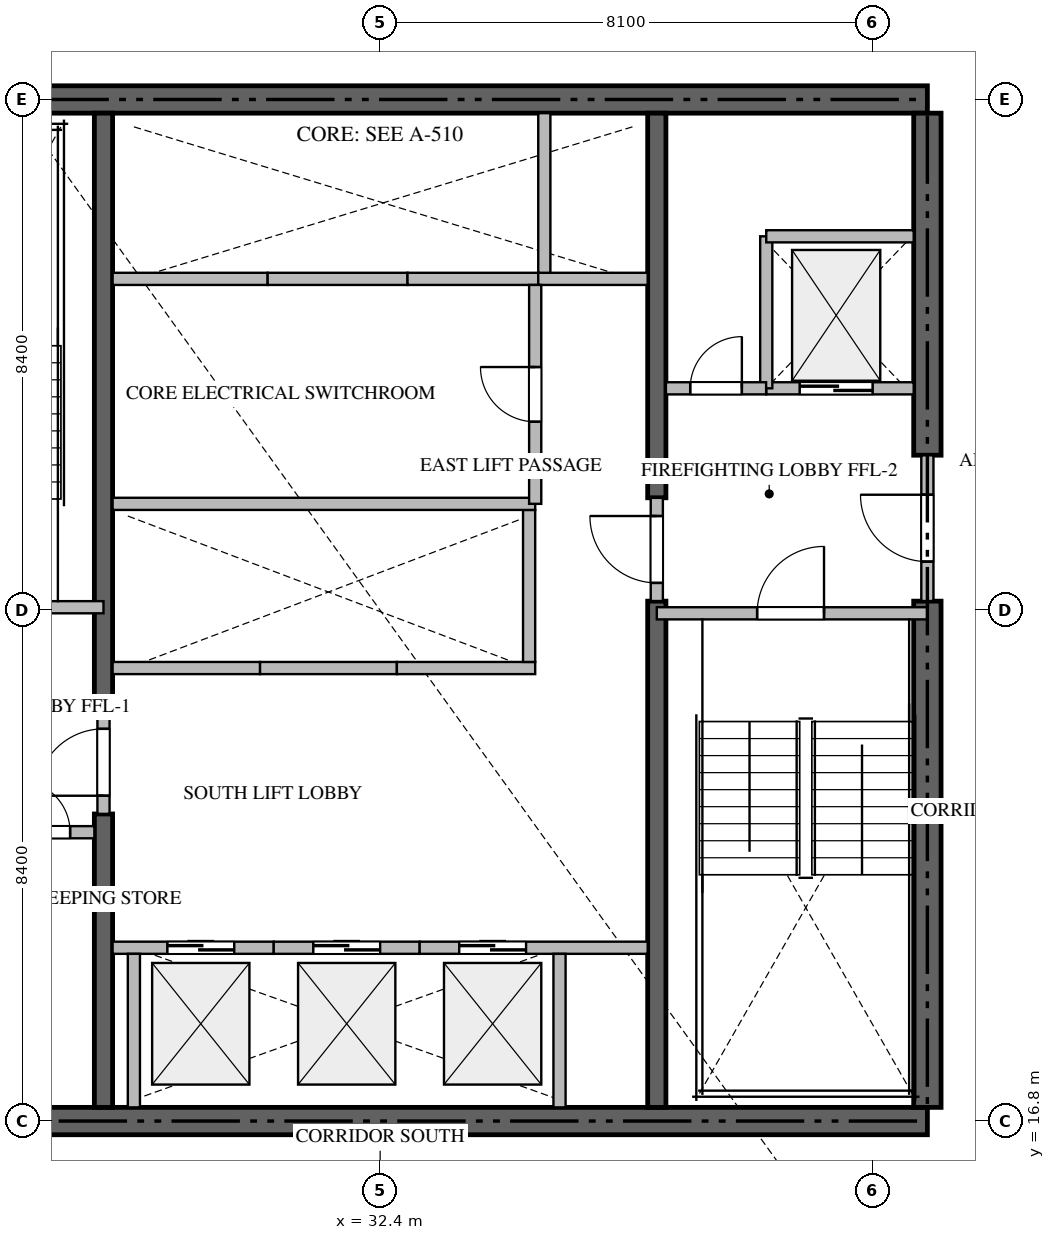
"""IFC4 building model, lengths in metres.
Left out: names, types, materials, properties, quantities, classifications, styles, units other than length and angle.
Written with IfcOpenShell. Run it as: python <this file> out.ifc"""

import sys

from ifc_helpers import new_model, si_unit, direction, frame, frame_2d, origin, place, context, subcontext, project, spatial, rectangle, extrude, source, transform, mapped, element, fill, save


model = new_model("IFC4")
c1 = context("Model", 3, precision=1e-05, world=origin(), true_north=direction((0.0, 1.0)))
c2 = subcontext(c1, "Body", "Model", "MODEL_VIEW")
j1 = project(units=[si_unit("LENGTHUNIT", "METRE"), si_unit("PLANEANGLEUNIT", "RADIAN")], contexts=[c1])
p1 = place(None, origin())
s1 = spatial("IfcSite", under=j1, at=p1, CompositionType="ELEMENT")
p2 = place(p1, origin())
s2 = spatial("IfcBuilding", under=s1, at=p2, CompositionType="ELEMENT")
p3 = place(p2, frame((0.0, 0.0, 86.7)))
s3 = spatial("IfcBuildingStorey", under=s2, at=p3, CompositionType="ELEMENT", Elevation=86.7)
for number, where, z_axis, x_axis in (
    (1, (23.4, 16.8, -0.26), (0.0, 0.0, 1.0), (1.0, 0.0, 0.0)),
    (2, (41.4, 33.6, -0.26), (0.0, 0.0, 1.0), (-1.0, 0.0, 0.0)),
):
    element("IfcWall", number, at=place(p3, frame(where, z_axis=z_axis, x_axis=x_axis)), inside=s3, PredefinedType="SHEAR", context=c2, shape_type="SweptSolid", body=[
        extrude(rectangle(XDim=18.0, YDim=0.45, at=frame_2d((9.0, 0.0))), origin(), (0.0, 0.0, 1.0), 3.748),
    ])
p4 = place(p3, frame((41.4, 17.025, -0.26), z_axis=(0.0, 0.0, 1.0), x_axis=(0.0, 1.0, 0.0)))
e3 = element("IfcWall", 3, at=p4, inside=s3, PredefinedType="SHEAR", context=c2, shape_type="SweptSolid", body=[
    extrude(rectangle(XDim=8.325, YDim=0.45, at=frame_2d((4.163, 0.0))), origin(), (0.0, 0.0, 1.0), 3.748),
])
p5 = place(p3, frame((41.4, 27.75, -0.26), z_axis=(0.0, 0.0, 1.0), x_axis=(0.0, 1.0, 0.0)))
e4 = element("IfcWall", 4, at=p5, inside=s3, PredefinedType="SHEAR", context=c2, shape_type="SweptSolid", body=[
    extrude(rectangle(XDim=5.625, YDim=0.45, at=frame_2d((2.812, 0.0))), origin(), (0.0, 0.0, 1.0), 3.748),
])
p6 = place(p3, frame((27.85, 17.025, -0.26), z_axis=(0.0, 0.0, 1.0), x_axis=(0.0, 1.0, 0.0)))
e5 = element("IfcWall", 5, at=p6, inside=s3, PredefinedType="SHEAR", context=c2, shape_type="SweptSolid", body=[
    extrude(rectangle(XDim=4.825, YDim=0.3, at=frame_2d((2.413, 0.0))), origin(), (0.0, 0.0, 1.0), 3.748),
])
p7 = place(p3, frame((27.85, 23.55, -0.26), z_axis=(0.0, 0.0, 1.0), x_axis=(0.0, 1.0, 0.0)))
e6 = element("IfcWall", 6, at=p7, inside=s3, PredefinedType="SHEAR", context=c2, shape_type="SweptSolid", body=[
    extrude(rectangle(XDim=9.825, YDim=0.3, at=frame_2d((4.913, 0.0))), origin(), (0.0, 0.0, 1.0), 3.748),
])
p8 = place(p3, frame((36.95, 17.025, -0.26), z_axis=(0.0, 0.0, 1.0), x_axis=(0.0, 1.0, 0.0)))
e7 = element("IfcWall", 7, at=p8, inside=s3, PredefinedType="SHEAR", context=c2, shape_type="SweptSolid", body=[
    extrude(rectangle(XDim=8.325, YDim=0.3, at=frame_2d((4.163, 0.0))), origin(), (0.0, 0.0, 1.0), 3.748),
])
p9 = place(p3, frame((36.95, 27.05, -0.26), z_axis=(0.0, 0.0, 1.0), x_axis=(0.0, 1.0, 0.0)))
e8 = element("IfcWall", 8, at=p9, inside=s3, PredefinedType="SHEAR", context=c2, shape_type="SweptSolid", body=[
    extrude(rectangle(XDim=6.325, YDim=0.3, at=frame_2d((3.163, 0.0))), origin(), (0.0, 0.0, 1.0), 3.748),
])
p10 = place(p3, frame((23.4, 25.25, 0.0), z_axis=(0.0, 0.0, 1.0), x_axis=(1.0, 0.0, 0.0)))
e9 = element("IfcWall", 9, at=p10, inside=s3, PredefinedType="STANDARD", context=c2, shape_type="SweptSolid", body=[
    extrude(rectangle(XDim=4.45, YDim=0.2, at=frame_2d((2.225, 0.0))), origin(), (0.0, 0.0, 1.0), 3.49),
])
p11 = place(p10, frame((1.65, 0.0, 0.0)))
e10 = element("IfcOpeningElement", 10, at=p11, cuts=e9, PredefinedType="OPENING", context=c2, shape_type="SweptSolid", body=[
    extrude(rectangle(XDim=1.1, YDim=2.15, at=frame_2d((0.55, 1.075))), frame((0.0, 0.11, 0.0), z_axis=(0.0, -1.0, 0.0), x_axis=(1.0, 0.0, 0.0)), (0.0, 0.0, 1.0), 0.22),
])
p12 = place(p3, frame((36.95, 25.15, 0.0), z_axis=(0.0, 0.0, 1.0), x_axis=(1.0, 0.0, 0.0)))
e11 = element("IfcWall", 11, at=p12, inside=s3, PredefinedType="STANDARD", context=c2, shape_type="SweptSolid", body=[
    extrude(rectangle(XDim=4.45, YDim=0.2, at=frame_2d((2.225, 0.0))), origin(), (0.0, 0.0, 1.0), 3.49),
])
p13 = place(p12, frame((1.65, 0.0, 0.0)))
e12 = element("IfcOpeningElement", 12, at=p13, cuts=e11, PredefinedType="OPENING", context=c2, shape_type="SweptSolid", body=[
    extrude(rectangle(XDim=1.1, YDim=2.15, at=frame_2d((0.55, 1.075))), frame((0.0, 0.11, 0.0), z_axis=(0.0, -1.0, 0.0), x_axis=(1.0, 0.0, 0.0)), (0.0, 0.0, 1.0), 0.22),
])
p14 = place(p3, frame((38.75, 28.85, 0.0), z_axis=(0.0, 0.0, 1.0), x_axis=(1.0, 0.0, 0.0)))
e13 = element("IfcWall", 13, at=p14, inside=s3, PredefinedType="STANDARD", context=c2, shape_type="SweptSolid", body=[
    extrude(rectangle(XDim=2.425, YDim=0.2, at=frame_2d((1.212, 0.0))), origin(), (0.0, 0.0, 1.0), 3.49),
])
p15 = place(p14, frame((0.55, 0.0, 0.0)))
e14 = element("IfcOpeningElement", 14, at=p15, cuts=e13, PredefinedType="OPENING", context=c2, shape_type="SweptSolid", body=[
    extrude(rectangle(XDim=1.2, YDim=2.2, at=frame_2d((0.6, 1.1))), frame((0.0, 0.11, 0.0), z_axis=(0.0, -1.0, 0.0), x_axis=(1.0, 0.0, 0.0)), (0.0, 0.0, 1.0), 0.22),
])
p16 = place(p3, frame((28.0, 19.65, 0.0), z_axis=(0.0, 0.0, 1.0), x_axis=(1.0, 0.0, 0.0)))
e15 = element("IfcWall", 15, at=p16, inside=s3, PredefinedType="STANDARD", context=c2, shape_type="SweptSolid", body=[
    extrude(rectangle(XDim=2.65, YDim=0.2, at=frame_2d((1.325, 0.0))), origin(), (0.0, 0.0, 1.0), 3.49),
])
p17 = place(p16, frame((0.9, 0.0, 0.0)))
e16 = element("IfcOpeningElement", 16, at=p17, cuts=e15, PredefinedType="OPENING", context=c2, shape_type="SweptSolid", body=[
    extrude(rectangle(XDim=1.1, YDim=2.2, at=frame_2d((0.55, 1.1))), frame((0.0, 0.11, 0.0), z_axis=(0.0, -1.0, 0.0), x_axis=(1.0, 0.0, 0.0)), (0.0, 0.0, 1.0), 0.22),
])
p18 = place(p3, frame((28.35, 17.025, 0.0), z_axis=(0.0, 0.0, 1.0), x_axis=(0.0, 1.0, 0.0)))
e17 = element("IfcWall", 17, at=p18, inside=s3, PredefinedType="STANDARD", context=c2, shape_type="SweptSolid", body=[
    extrude(rectangle(XDim=2.525, YDim=0.2, at=frame_2d((1.263, 0.0))), origin(), (0.0, 0.0, 1.0), 3.49),
])
p19 = place(p3, frame((30.65, 19.65, 0.0), z_axis=(0.0, 0.0, 1.0), x_axis=(1.0, 0.0, 0.0)))
e18 = element("IfcWall", 18, at=p19, inside=s3, PredefinedType="STANDARD", context=c2, shape_type="SweptSolid", body=[
    extrude(rectangle(XDim=2.4, YDim=0.2, at=frame_2d((1.2, 0.0))), origin(), (0.0, 0.0, 1.0), 3.49),
])
p20 = place(p19, frame((0.65, 0.0, 0.0)))
e19 = element("IfcOpeningElement", 19, at=p20, cuts=e18, PredefinedType="OPENING", context=c2, shape_type="SweptSolid", body=[
    extrude(rectangle(XDim=1.1, YDim=2.2, at=frame_2d((0.55, 1.1))), frame((0.0, 0.11, 0.0), z_axis=(0.0, -1.0, 0.0), x_axis=(1.0, 0.0, 0.0)), (0.0, 0.0, 1.0), 0.22),
])
p21 = place(p3, frame((33.05, 19.65, 0.0), z_axis=(0.0, 0.0, 1.0), x_axis=(1.0, 0.0, 0.0)))
e20 = element("IfcWall", 20, at=p21, inside=s3, PredefinedType="STANDARD", context=c2, shape_type="SweptSolid", body=[
    extrude(rectangle(XDim=3.75, YDim=0.2, at=frame_2d((1.875, 0.0))), origin(), (0.0, 0.0, 1.0), 3.49),
])
p22 = place(p21, frame((0.65, 0.0, 0.0)))
e21 = element("IfcOpeningElement", 21, at=p22, cuts=e20, PredefinedType="OPENING", context=c2, shape_type="SweptSolid", body=[
    extrude(rectangle(XDim=1.1, YDim=2.2, at=frame_2d((0.55, 1.1))), frame((0.0, 0.11, 0.0), z_axis=(0.0, -1.0, 0.0), x_axis=(1.0, 0.0, 0.0)), (0.0, 0.0, 1.0), 0.22),
])
p23 = place(p3, frame((35.35, 17.025, 0.0), z_axis=(0.0, 0.0, 1.0), x_axis=(0.0, 1.0, 0.0)))
e22 = element("IfcWall", 22, at=p23, inside=s3, PredefinedType="STANDARD", context=c2, shape_type="SweptSolid", body=[
    extrude(rectangle(XDim=2.525, YDim=0.2, at=frame_2d((1.263, 0.0))), origin(), (0.0, 0.0, 1.0), 3.49),
])
p24 = place(p3, frame((28.0, 24.25, 0.0), z_axis=(0.0, 0.0, 1.0), x_axis=(1.0, 0.0, 0.0)))
e23 = element("IfcWall", 23, at=p24, inside=s3, PredefinedType="STANDARD", context=c2, shape_type="SweptSolid", body=[
    extrude(rectangle(XDim=2.425, YDim=0.2, at=frame_2d((1.212, 0.0))), origin(), (0.0, 0.0, 1.0), 3.49),
])
p25 = place(p3, frame((30.425, 24.25, 0.0), z_axis=(0.0, 0.0, 1.0), x_axis=(1.0, 0.0, 0.0)))
e24 = element("IfcWall", 24, at=p25, inside=s3, PredefinedType="STANDARD", context=c2, shape_type="SweptSolid", body=[
    extrude(rectangle(XDim=2.25, YDim=0.2, at=frame_2d((1.125, 0.0))), origin(), (0.0, 0.0, 1.0), 3.49),
])
p26 = place(p3, frame((32.675, 24.25, 0.0), z_axis=(0.0, 0.0, 1.0), x_axis=(1.0, 0.0, 0.0)))
e25 = element("IfcWall", 25, at=p26, inside=s3, PredefinedType="STANDARD", context=c2, shape_type="SweptSolid", body=[
    extrude(rectangle(XDim=2.275, YDim=0.2, at=frame_2d((1.137, 0.0))), origin(), (0.0, 0.0, 1.0), 3.49),
])
p27 = place(p3, frame((34.85, 24.35, 0.0), z_axis=(0.0, 0.0, 1.0), x_axis=(0.0, 1.0, 0.0)))
e26 = element("IfcWall", 26, at=p27, inside=s3, PredefinedType="STANDARD", context=c2, shape_type="SweptSolid", body=[
    extrude(rectangle(XDim=2.5, YDim=0.2, at=frame_2d((1.25, 0.0))), origin(), (0.0, 0.0, 1.0), 3.49),
])
p28 = place(p3, frame((28.0, 30.65, 0.0), z_axis=(0.0, 0.0, 1.0), x_axis=(1.0, 0.0, 0.0)))
e27 = element("IfcWall", 27, at=p28, inside=s3, PredefinedType="STANDARD", context=c2, shape_type="SweptSolid", body=[
    extrude(rectangle(XDim=2.55, YDim=0.2, at=frame_2d((1.275, 0.0))), origin(), (0.0, 0.0, 1.0), 3.49),
])
p29 = place(p3, frame((30.55, 30.65, 0.0), z_axis=(0.0, 0.0, 1.0), x_axis=(1.0, 0.0, 0.0)))
e28 = element("IfcWall", 28, at=p29, inside=s3, PredefinedType="STANDARD", context=c2, shape_type="SweptSolid", body=[
    extrude(rectangle(XDim=2.3, YDim=0.2, at=frame_2d((1.15, 0.0))), origin(), (0.0, 0.0, 1.0), 3.49),
])
p30 = place(p3, frame((32.85, 30.65, 0.0), z_axis=(0.0, 0.0, 1.0), x_axis=(1.0, 0.0, 0.0)))
e29 = element("IfcWall", 29, at=p30, inside=s3, PredefinedType="STANDARD", context=c2, shape_type="SweptSolid", body=[
    extrude(rectangle(XDim=2.15, YDim=0.2, at=frame_2d((1.075, 0.0))), origin(), (0.0, 0.0, 1.0), 3.49),
])
p31 = place(p3, frame((35.0, 30.65, 0.0), z_axis=(0.0, 0.0, 1.0), x_axis=(1.0, 0.0, 0.0)))
e30 = element("IfcWall", 30, at=p31, inside=s3, PredefinedType="STANDARD", context=c2, shape_type="SweptSolid", body=[
    extrude(rectangle(XDim=1.8, YDim=0.2, at=frame_2d((0.9, 0.0))), origin(), (0.0, 0.0, 1.0), 3.49),
])
p32 = place(p3, frame((35.1, 30.75, 0.0), z_axis=(0.0, 0.0, 1.0), x_axis=(0.0, 1.0, 0.0)))
e31 = element("IfcWall", 31, at=p32, inside=s3, PredefinedType="STANDARD", context=c2, shape_type="SweptSolid", body=[
    extrude(rectangle(XDim=2.625, YDim=0.2, at=frame_2d((1.312, 0.0))), origin(), (0.0, 0.0, 1.0), 3.49),
])
p33 = place(p3, frame((26.052, 21.55, 0.0), z_axis=(0.0, 0.0, 1.0), x_axis=(1.0, 0.0, 0.0)))
e32 = element("IfcWall", 32, at=p33, inside=s3, PredefinedType="STANDARD", context=c2, shape_type="SweptSolid", body=[
    extrude(rectangle(XDim=1.648, YDim=0.2, at=frame_2d((0.824, 0.0))), origin(), (0.0, 0.0, 1.0), 3.49),
])
p34 = place(p33, frame((0.399, 0.0, 0.0)))
e33 = element("IfcOpeningElement", 33, at=p34, cuts=e32, PredefinedType="OPENING", context=c2, shape_type="SweptSolid", body=[
    extrude(rectangle(XDim=0.85, YDim=2.1, at=frame_2d((0.425, 1.05))), frame((0.0, 0.11, 0.0), z_axis=(0.0, -1.0, 0.0), x_axis=(1.0, 0.0, 0.0)), (0.0, 0.0, 1.0), 0.22),
])
p35 = place(p3, frame((38.75, 28.85, 0.0), z_axis=(0.0, 0.0, 1.0), x_axis=(0.0, 1.0, 0.0)))
e34 = element("IfcWall", 34, at=p35, inside=s3, PredefinedType="STANDARD", context=c2, shape_type="SweptSolid", body=[
    extrude(rectangle(XDim=2.5, YDim=0.2, at=frame_2d((1.25, 0.0))), origin(), (0.0, 0.0, 1.0), 3.49),
])
p36 = place(p3, frame((38.75, 31.35, 0.0), z_axis=(0.0, 0.0, 1.0), x_axis=(1.0, 0.0, 0.0)))
e35 = element("IfcWall", 35, at=p36, inside=s3, PredefinedType="STANDARD", context=c2, shape_type="SweptSolid", body=[
    extrude(rectangle(XDim=2.425, YDim=0.2, at=frame_2d((1.212, 0.0))), origin(), (0.0, 0.0, 1.0), 3.49),
])
p37 = place(p3, frame((37.1, 28.85, 0.0), z_axis=(0.0, 0.0, 1.0), x_axis=(1.0, 0.0, 0.0)))
e36 = element("IfcWall", 36, at=p37, inside=s3, PredefinedType="STANDARD", context=c2, shape_type="SweptSolid", body=[
    extrude(rectangle(XDim=1.648, YDim=0.2, at=frame_2d((0.824, 0.0))), origin(), (0.0, 0.0, 1.0), 3.49),
])
p38 = place(p37, frame((0.399, 0.0, 0.0)))
e37 = element("IfcOpeningElement", 37, at=p38, cuts=e36, PredefinedType="OPENING", context=c2, shape_type="SweptSolid", body=[
    extrude(rectangle(XDim=0.85, YDim=2.1, at=frame_2d((0.425, 1.05))), frame((0.0, 0.11, 0.0), z_axis=(0.0, -1.0, 0.0), x_axis=(1.0, 0.0, 0.0)), (0.0, 0.0, 1.0), 0.22),
])
p39 = place(p3, frame((41.4, 25.352, 0.0), z_axis=(0.0, 0.0, 1.0), x_axis=(0.0, 1.0, 0.0)))
e38 = element("IfcWall", 38, at=p39, inside=s3, PredefinedType="STANDARD", context=c2, shape_type="SweptSolid", body=[
    extrude(rectangle(XDim=2.396, YDim=0.2, at=frame_2d((1.198, 0.0))), origin(), (0.0, 0.0, 1.0), 3.49),
])
p40 = place(p39, frame((0.648, 0.0, 0.0)))
e39 = element("IfcOpeningElement", 39, at=p40, cuts=e38, PredefinedType="OPENING", context=c2, shape_type="SweptSolid", body=[
    extrude(rectangle(XDim=1.1, YDim=2.15, at=frame_2d((0.55, 1.075))), frame((0.0, 0.11, 0.0), z_axis=(0.0, -1.0, 0.0), x_axis=(1.0, 0.0, 0.0)), (0.0, 0.0, 1.0), 0.22),
])
p41 = place(p3, frame((27.85, 21.852, 0.0), z_axis=(0.0, 0.0, 1.0), x_axis=(0.0, 1.0, 0.0)))
e40 = element("IfcWall", 40, at=p41, inside=s3, PredefinedType="STANDARD", context=c2, shape_type="SweptSolid", body=[
    extrude(rectangle(XDim=1.696, YDim=0.2, at=frame_2d((0.848, 0.0))), origin(), (0.0, 0.0, 1.0), 3.49),
])
p42 = place(p41, frame((0.298, 0.0, 0.0)))
e41 = element("IfcOpeningElement", 41, at=p42, cuts=e40, PredefinedType="OPENING", context=c2, shape_type="SweptSolid", body=[
    extrude(rectangle(XDim=1.1, YDim=2.15, at=frame_2d((0.55, 1.075))), frame((0.0, 0.11, 0.0), z_axis=(0.0, -1.0, 0.0), x_axis=(1.0, 0.0, 0.0)), (0.0, 0.0, 1.0), 0.22),
])
p43 = place(p3, frame((36.95, 25.352, 0.0), z_axis=(0.0, 0.0, 1.0), x_axis=(0.0, 1.0, 0.0)))
e42 = element("IfcWall", 42, at=p43, inside=s3, PredefinedType="STANDARD", context=c2, shape_type="SweptSolid", body=[
    extrude(rectangle(XDim=1.696, YDim=0.2, at=frame_2d((0.848, 0.0))), origin(), (0.0, 0.0, 1.0), 3.49),
])
p44 = place(p43, frame((0.298, 0.0, 0.0)))
e43 = element("IfcOpeningElement", 43, at=p44, cuts=e42, PredefinedType="OPENING", context=c2, shape_type="SweptSolid", body=[
    extrude(rectangle(XDim=1.1, YDim=2.15, at=frame_2d((0.55, 1.075))), frame((0.0, 0.11, 0.0), z_axis=(0.0, -1.0, 0.0), x_axis=(1.0, 0.0, 0.0)), (0.0, 0.0, 1.0), 0.22),
])
p45 = place(p3, frame((28.0, 26.95, 0.0), z_axis=(0.0, 0.0, 1.0), x_axis=(1.0, 0.0, 0.0)))
e44 = element("IfcWall", 44, at=p45, inside=s3, PredefinedType="STANDARD", context=c2, shape_type="SweptSolid", body=[
    extrude(rectangle(XDim=6.95, YDim=0.2, at=frame_2d((3.475, 0.0))), origin(), (0.0, 0.0, 1.0), 3.49),
])
p46 = place(p3, frame((34.95, 26.95, 0.0), z_axis=(0.0, 0.0, 1.0), x_axis=(0.0, 1.0, 0.0)))
e45 = element("IfcWall", 45, at=p46, inside=s3, PredefinedType="STANDARD", context=c2, shape_type="SweptSolid", body=[
    extrude(rectangle(XDim=3.6, YDim=0.2, at=frame_2d((1.8, 0.0))), origin(), (0.0, 0.0, 1.0), 3.49),
])
p47 = place(p46, frame((1.35, 0.0, 0.0)))
e46 = element("IfcOpeningElement", 46, at=p47, cuts=e45, PredefinedType="OPENING", context=c2, shape_type="SweptSolid", body=[
    extrude(rectangle(XDim=0.9, YDim=2.1, at=frame_2d((0.45, 1.05))), frame((0.0, 0.11, 0.0), z_axis=(0.0, -1.0, 0.0), x_axis=(1.0, 0.0, 0.0)), (0.0, 0.0, 1.0), 0.22),
])
m1 = source(origin(), c2, "Body", "SweptSolid", [
    extrude(rectangle(XDim=1.1, YDim=2.15, at=frame_2d((0.55, 1.075))), frame((0.0, 0.025, 0.0), z_axis=(0.0, -1.0, 0.0), x_axis=(1.0, 0.0, 0.0)), (0.0, 0.0, 1.0), 0.05),
])
p48 = place(p13, origin())
e47 = element("IfcDoor", 47, at=p48, inside=s3, OperationType="SINGLE_SWING_RIGHT", PredefinedType="DOOR", context=c2, shape_type="MappedRepresentation", body=[
    mapped(m1, transform((0.0, 0.0, 0.0), scale=1.0)),
])
fill(e12, e47)
m2 = source(origin(), c2, "Body", "SweptSolid", [
    extrude(rectangle(XDim=1.2, YDim=2.2, at=frame_2d((0.6, 1.1))), frame((0.0, 0.025, 0.0), z_axis=(0.0, -1.0, 0.0), x_axis=(1.0, 0.0, 0.0)), (0.0, 0.0, 1.0), 0.05),
])
p49 = place(p15, origin())
e48 = element("IfcDoor", 48, at=p49, inside=s3, OperationType="DOUBLE_DOOR_SLIDING", PredefinedType="DOOR", context=c2, shape_type="MappedRepresentation", body=[
    mapped(m2, transform((0.0, 0.0, 0.0), scale=1.0)),
])
fill(e14, e48)
m3 = source(origin(), c2, "Body", "SweptSolid", [
    extrude(rectangle(XDim=1.1, YDim=2.2, at=frame_2d((0.55, 1.1))), frame((0.0, 0.025, 0.0), z_axis=(0.0, -1.0, 0.0), x_axis=(1.0, 0.0, 0.0)), (0.0, 0.0, 1.0), 0.05),
])
p50 = place(p17, origin())
e49 = element("IfcDoor", 49, at=p50, inside=s3, OperationType="DOUBLE_DOOR_SLIDING", PredefinedType="DOOR", context=c2, shape_type="MappedRepresentation", body=[
    mapped(m3, transform((0.0, 0.0, 0.0), scale=1.0)),
])
fill(e16, e49)
p51 = place(p20, origin())
e50 = element("IfcDoor", 50, at=p51, inside=s3, OperationType="DOUBLE_DOOR_SLIDING", PredefinedType="DOOR", context=c2, shape_type="MappedRepresentation", body=[
    mapped(m3, transform((0.0, 0.0, 0.0), scale=1.0)),
])
fill(e19, e50)
p52 = place(p22, origin())
e51 = element("IfcDoor", 51, at=p52, inside=s3, OperationType="DOUBLE_DOOR_SLIDING", PredefinedType="DOOR", context=c2, shape_type="MappedRepresentation", body=[
    mapped(m3, transform((0.0, 0.0, 0.0), scale=1.0)),
])
fill(e21, e51)
m4 = source(origin(), c2, "Body", "SweptSolid", [
    extrude(rectangle(XDim=0.85, YDim=2.1, at=frame_2d((0.425, 1.05))), frame((0.0, 0.025, 0.0), z_axis=(0.0, -1.0, 0.0), x_axis=(1.0, 0.0, 0.0)), (0.0, 0.0, 1.0), 0.05),
])
p53 = place(p34, origin())
e52 = element("IfcDoor", 52, at=p53, inside=s3, OperationType="SINGLE_SWING_LEFT", PredefinedType="DOOR", context=c2, shape_type="MappedRepresentation", body=[
    mapped(m4, transform((0.0, 0.0, 0.0), scale=1.0)),
])
fill(e33, e52)
p54 = place(p38, origin())
e53 = element("IfcDoor", 53, at=p54, inside=s3, OperationType="SINGLE_SWING_RIGHT", PredefinedType="DOOR", context=c2, shape_type="MappedRepresentation", body=[
    mapped(m4, transform((0.0, 0.0, 0.0), scale=1.0)),
])
fill(e37, e53)
p55 = place(p40, origin())
e54 = element("IfcDoor", 54, at=p55, inside=s3, OperationType="SINGLE_SWING_RIGHT", PredefinedType="DOOR", context=c2, shape_type="MappedRepresentation", body=[
    mapped(m1, transform((0.0, 0.0, 0.0), scale=1.0)),
])
fill(e39, e54)
p56 = place(p42, origin())
e55 = element("IfcDoor", 55, at=p56, inside=s3, OperationType="SINGLE_SWING_LEFT", PredefinedType="DOOR", context=c2, shape_type="MappedRepresentation", body=[
    mapped(m1, transform((0.0, 0.0, 0.0), scale=1.0)),
])
fill(e41, e55)
p57 = place(p44, origin())
e56 = element("IfcDoor", 56, at=p57, inside=s3, OperationType="SINGLE_SWING_RIGHT", PredefinedType="DOOR", context=c2, shape_type="MappedRepresentation", body=[
    mapped(m1, transform((0.0, 0.0, 0.0), scale=1.0)),
])
fill(e43, e56)
m5 = source(origin(), c2, "Body", "SweptSolid", [
    extrude(rectangle(XDim=0.9, YDim=2.1, at=frame_2d((0.45, 1.05))), frame((0.0, 0.025, 0.0), z_axis=(0.0, -1.0, 0.0), x_axis=(1.0, 0.0, 0.0)), (0.0, 0.0, 1.0), 0.05),
])
p58 = place(p47, origin())
e57 = element("IfcDoor", 57, at=p58, inside=s3, OperationType="SINGLE_SWING_RIGHT", PredefinedType="DOOR", context=c2, shape_type="MappedRepresentation", body=[
    mapped(m5, transform((0.0, 0.0, 0.0), scale=1.0)),
])
fill(e46, e57)
save(model, sys.argv[1])
